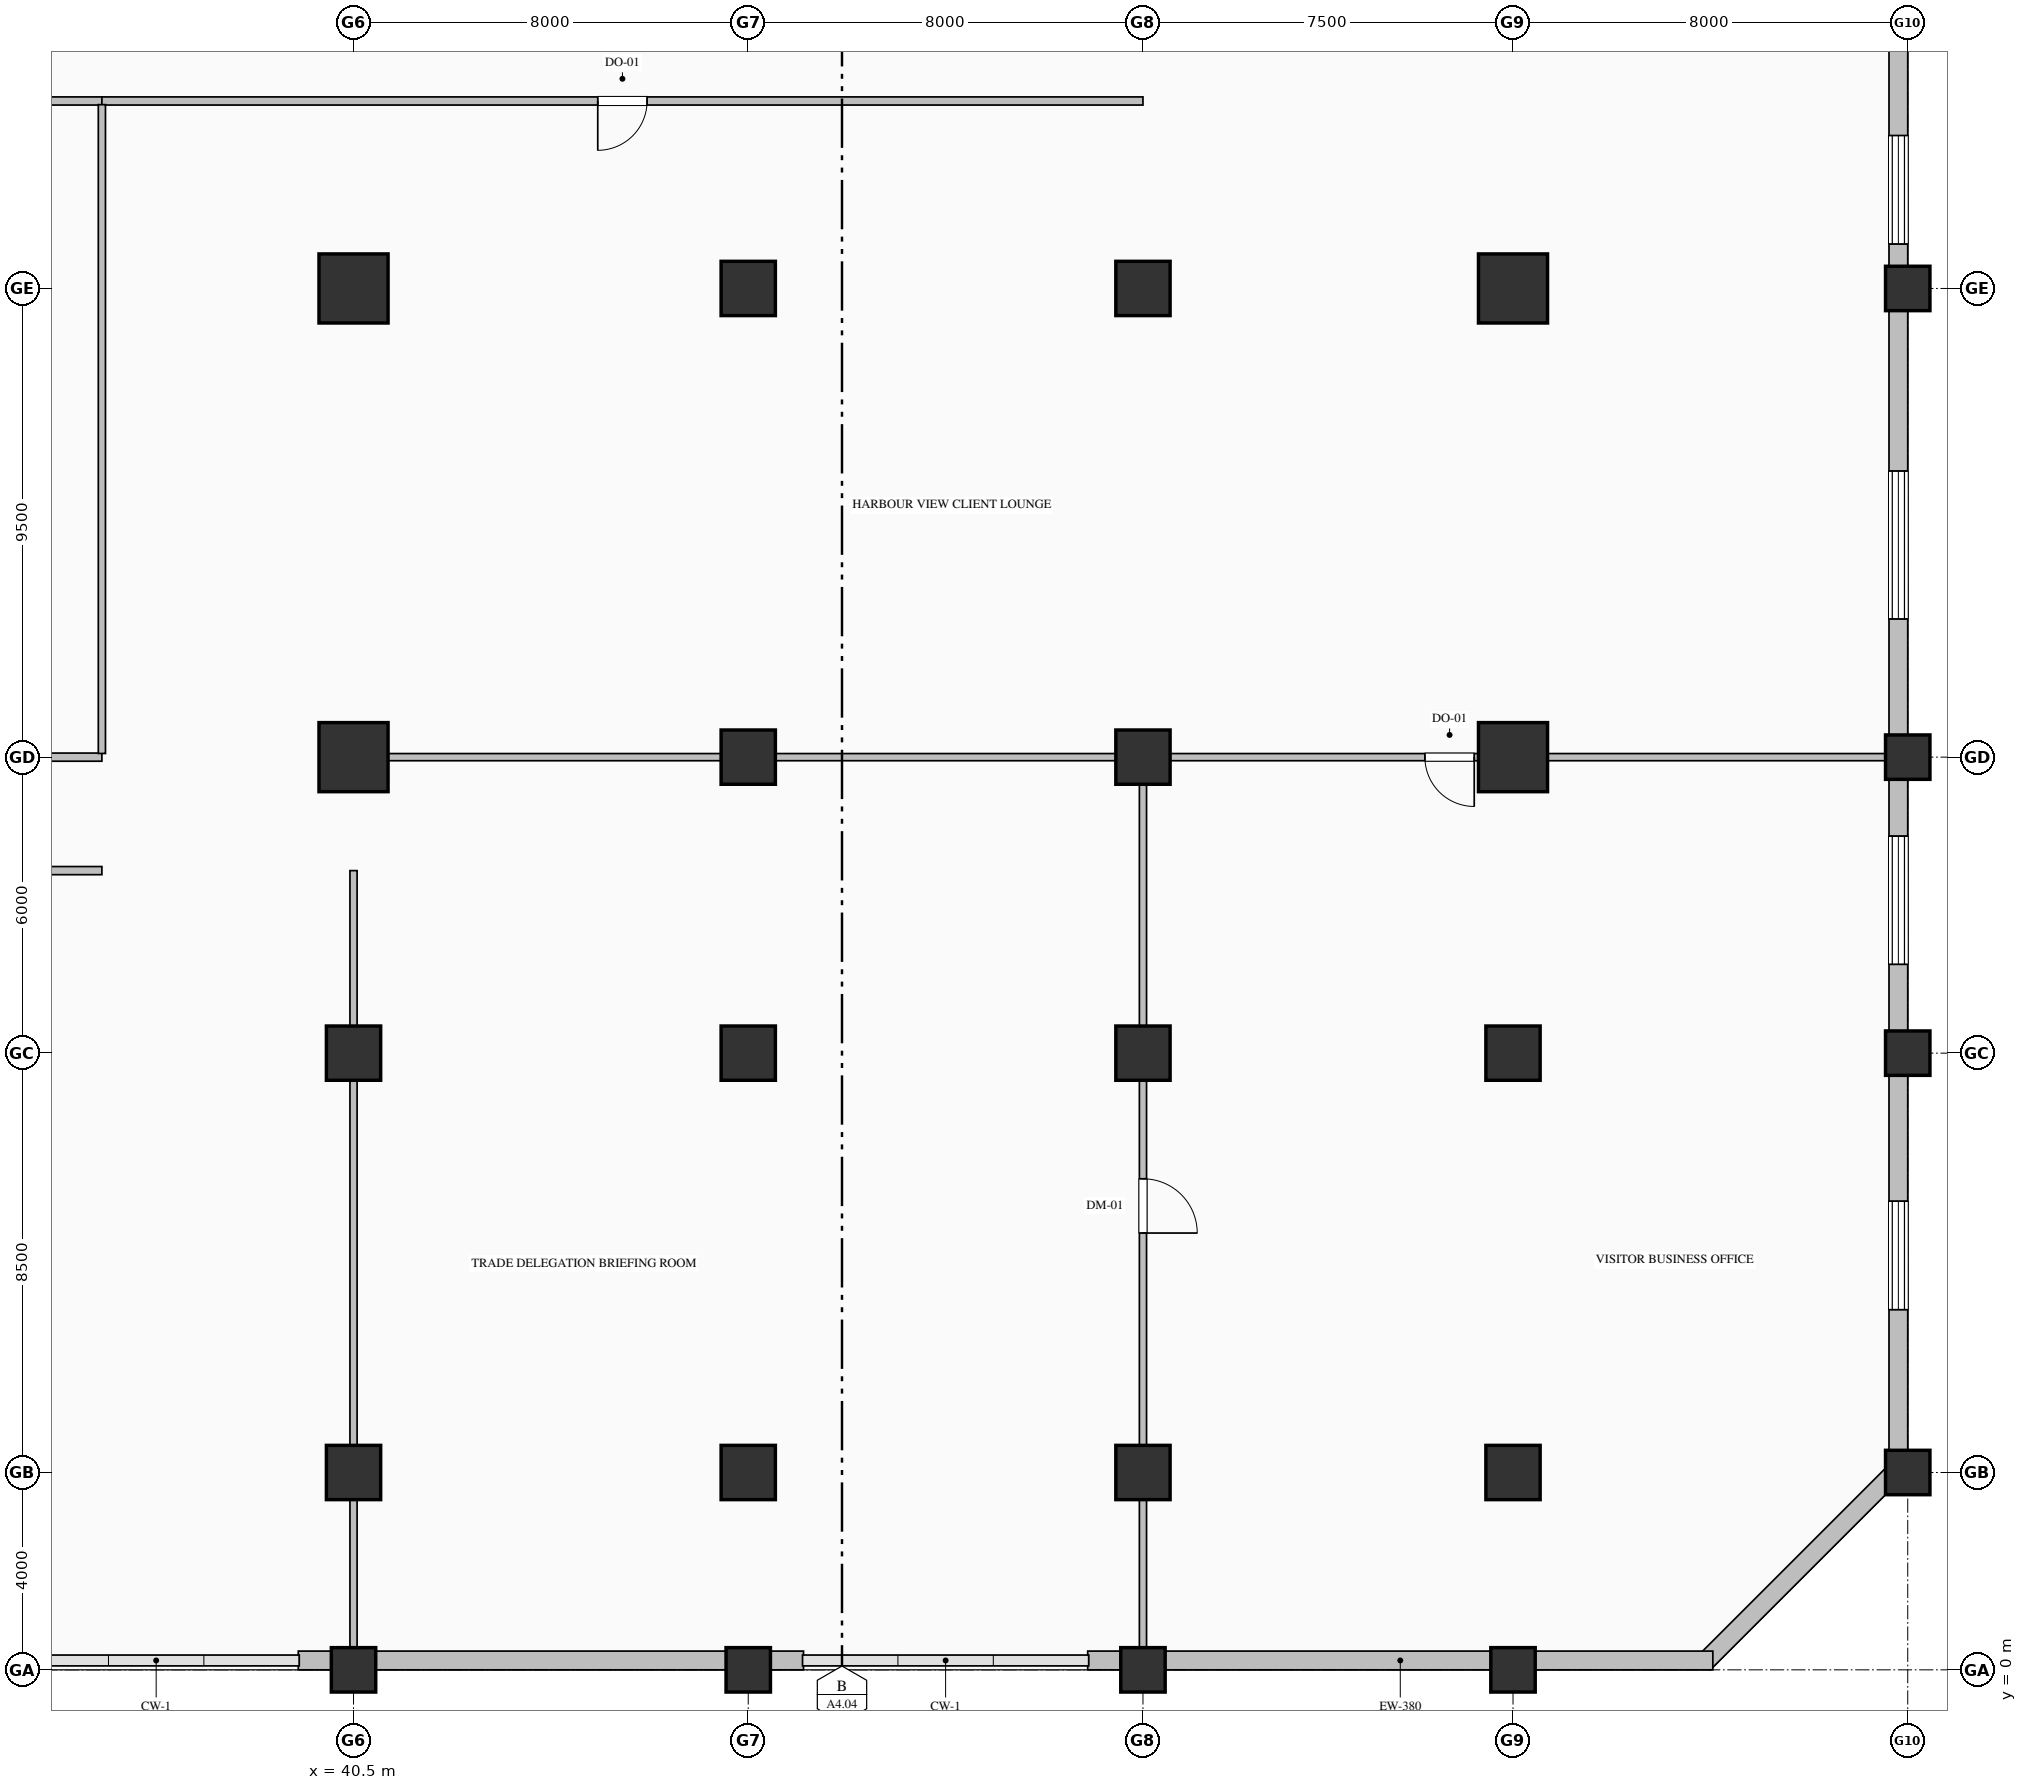
"""IFC4 building model, lengths in metres.
Left out: names, types, materials, properties, quantities, classifications, styles, units other than length and angle.
Written with IfcOpenShell. Run it as: python <this file> out.ifc"""

import sys

from ifc_helpers import new_model, si_unit, direction, frame, frame_2d, origin, origin_2d, place, context, subcontext, project, spatial, rectangle, hollow_rectangle, extrude, element, fill, save


model = new_model("IFC4")
c1 = context("Model", 3, precision=1e-05, world=origin(), true_north=direction((0.0, 1.0)))
c2 = subcontext(c1, "Body", "Model", "MODEL_VIEW")
j1 = project(units=[si_unit("LENGTHUNIT", "METRE"), si_unit("PLANEANGLEUNIT", "RADIAN")], contexts=[c1])
p1 = place(None, origin())
s1 = spatial("IfcSite", under=j1, at=p1, CompositionType="ELEMENT")
p2 = place(p1, origin())
s2 = spatial("IfcBuilding", under=s1, at=p2, CompositionType="ELEMENT")
p3 = place(p2, frame((0.0, 0.0, 6.0)))
s3 = spatial("IfcBuildingStorey", under=s2, at=p3, CompositionType="ELEMENT", Elevation=6.0)
p4 = place(p3, frame((40.5, 0.0, 0.0), z_axis=(0.0, 0.0, 1.0), x_axis=(1.0, 0.0, 0.0)))
e1 = element("IfcColumn", 1, at=p4, inside=s3, PredefinedType="PILASTER", context=c2, shape_type="SweptSolid", body=[
    extrude(rectangle(XDim=0.9, YDim=0.9, at=origin_2d()), origin(), (0.0, 0.0, 1.0), 5.4),
])
for number, where, z_axis, x_axis in (
    (2, (40.5, 4.0, 0.0), (0.0, 0.0, 1.0), (1.0, 0.0, 0.0)),
    (3, (40.5, 12.5, 0.0), (0.0, 0.0, 1.0), (1.0, 0.0, 0.0)),
):
    element("IfcColumn", number, at=place(p3, frame(where, z_axis=z_axis, x_axis=x_axis)), inside=s3, PredefinedType="COLUMN", context=c2, shape_type="SweptSolid", body=[
        extrude(rectangle(XDim=1.1, YDim=1.1, at=origin_2d()), origin(), (0.0, 0.0, 1.0), 5.4),
    ])
for number, where, z_axis, x_axis in (
    (4, (40.5, 18.5, 0.0), (0.0, 0.0, 1.0), (1.0, 0.0, 0.0)),
    (5, (40.5, 28.0, 0.0), (0.0, 0.0, 1.0), (1.0, 0.0, 0.0)),
):
    element("IfcColumn", number, at=place(p3, frame(where, z_axis=z_axis, x_axis=x_axis)), inside=s3, PredefinedType="COLUMN", context=c2, shape_type="SweptSolid", body=[
        extrude(hollow_rectangle(XDim=1.4, YDim=1.4, WallThickness=0.05, at=origin_2d()), origin(), (0.0, 0.0, 1.0), 5.4),
    ])
p5 = place(p3, frame((48.5, 0.0, 0.0), z_axis=(0.0, 0.0, 1.0), x_axis=(1.0, 0.0, 0.0)))
e6 = element("IfcColumn", 6, at=p5, inside=s3, PredefinedType="PILASTER", context=c2, shape_type="SweptSolid", body=[
    extrude(rectangle(XDim=0.9, YDim=0.9, at=origin_2d()), origin(), (0.0, 0.0, 1.0), 5.4),
])
for number, where, z_axis, x_axis in (
    (7, (48.5, 4.0, 0.0), (0.0, 0.0, 1.0), (1.0, 0.0, 0.0)),
    (8, (48.5, 12.5, 0.0), (0.0, 0.0, 1.0), (1.0, 0.0, 0.0)),
    (9, (48.5, 18.5, 0.0), (0.0, 0.0, 1.0), (1.0, 0.0, 0.0)),
    (10, (48.5, 28.0, 0.0), (0.0, 0.0, 1.0), (1.0, 0.0, 0.0)),
):
    element("IfcColumn", number, at=place(p3, frame(where, z_axis=z_axis, x_axis=x_axis)), inside=s3, PredefinedType="COLUMN", context=c2, shape_type="SweptSolid", body=[
        extrude(rectangle(XDim=1.1, YDim=1.1, at=origin_2d()), origin(), (0.0, 0.0, 1.0), 5.4),
    ])
p6 = place(p3, frame((56.5, 0.0, 0.0), z_axis=(0.0, 0.0, 1.0), x_axis=(1.0, 0.0, 0.0)))
e11 = element("IfcColumn", 11, at=p6, inside=s3, PredefinedType="PILASTER", context=c2, shape_type="SweptSolid", body=[
    extrude(rectangle(XDim=0.9, YDim=0.9, at=origin_2d()), origin(), (0.0, 0.0, 1.0), 5.4),
])
for number, where, z_axis, x_axis in (
    (12, (56.5, 4.0, 0.0), (0.0, 0.0, 1.0), (1.0, 0.0, 0.0)),
    (13, (56.5, 12.5, 0.0), (0.0, 0.0, 1.0), (1.0, 0.0, 0.0)),
    (14, (56.5, 18.5, 0.0), (0.0, 0.0, 1.0), (1.0, 0.0, 0.0)),
    (15, (56.5, 28.0, 0.0), (0.0, 0.0, 1.0), (1.0, 0.0, 0.0)),
):
    element("IfcColumn", number, at=place(p3, frame(where, z_axis=z_axis, x_axis=x_axis)), inside=s3, PredefinedType="COLUMN", context=c2, shape_type="SweptSolid", body=[
        extrude(rectangle(XDim=1.1, YDim=1.1, at=origin_2d()), origin(), (0.0, 0.0, 1.0), 5.4),
    ])
p7 = place(p3, frame((64.0, 0.0, 0.0), z_axis=(0.0, 0.0, 1.0), x_axis=(1.0, 0.0, 0.0)))
e16 = element("IfcColumn", 16, at=p7, inside=s3, PredefinedType="PILASTER", context=c2, shape_type="SweptSolid", body=[
    extrude(rectangle(XDim=0.9, YDim=0.9, at=origin_2d()), origin(), (0.0, 0.0, 1.0), 5.4),
])
for number, where, z_axis, x_axis in (
    (17, (64.0, 4.0, 0.0), (0.0, 0.0, 1.0), (1.0, 0.0, 0.0)),
    (18, (64.0, 12.5, 0.0), (0.0, 0.0, 1.0), (1.0, 0.0, 0.0)),
):
    element("IfcColumn", number, at=place(p3, frame(where, z_axis=z_axis, x_axis=x_axis)), inside=s3, PredefinedType="COLUMN", context=c2, shape_type="SweptSolid", body=[
        extrude(rectangle(XDim=1.1, YDim=1.1, at=origin_2d()), origin(), (0.0, 0.0, 1.0), 5.4),
    ])
for number, where, z_axis, x_axis in (
    (19, (64.0, 18.5, 0.0), (0.0, 0.0, 1.0), (1.0, 0.0, 0.0)),
    (20, (64.0, 28.0, 0.0), (0.0, 0.0, 1.0), (1.0, 0.0, 0.0)),
):
    element("IfcColumn", number, at=place(p3, frame(where, z_axis=z_axis, x_axis=x_axis)), inside=s3, PredefinedType="COLUMN", context=c2, shape_type="SweptSolid", body=[
        extrude(hollow_rectangle(XDim=1.4, YDim=1.4, WallThickness=0.05, at=origin_2d()), origin(), (0.0, 0.0, 1.0), 5.4),
    ])
for number, where, z_axis, x_axis in (
    (21, (72.0, 4.0, 0.0), (0.0, 0.0, 1.0), (1.0, 0.0, 0.0)),
    (22, (72.0, 12.5, 0.0), (0.0, 0.0, 1.0), (1.0, 0.0, 0.0)),
    (23, (72.0, 18.5, 0.0), (0.0, 0.0, 1.0), (1.0, 0.0, 0.0)),
    (24, (72.0, 28.0, 0.0), (0.0, 0.0, 1.0), (1.0, 0.0, 0.0)),
):
    element("IfcColumn", number, at=place(p3, frame(where, z_axis=z_axis, x_axis=x_axis)), inside=s3, PredefinedType="PILASTER", context=c2, shape_type="SweptSolid", body=[
        extrude(rectangle(XDim=0.9, YDim=0.9, at=origin_2d()), origin(), (0.0, 0.0, 1.0), 5.4),
    ])
p8 = place(p3, frame((71.81, 48.0, 0.0), z_axis=(0.0, 0.0, 1.0), x_axis=(0.0, -1.0, 0.0)))
e25 = element("IfcWall", 25, at=p8, inside=s3, PredefinedType="SOLIDWALL", context=c2, shape_type="SweptSolid", body=[
    extrude(rectangle(XDim=44.0, YDim=0.38, at=frame_2d((22.0, 0.0))), origin(), (0.0, 0.0, 1.0), 4.62),
])
p9 = place(p8, frame((6.1, 0.0, 0.9)))
e26 = element("IfcOpeningElement", 26, at=p9, cuts=e25, PredefinedType="OPENING", context=c2, shape_type="SweptSolid", body=[
    extrude(rectangle(XDim=2.2, YDim=2.65, at=frame_2d((1.1, 1.325))), frame((0.0, 0.2, 0.0), z_axis=(0.0, -1.0, 0.0), x_axis=(1.0, 0.0, 0.0)), (0.0, 0.0, 1.0), 0.4),
])
p10 = place(p8, frame((16.9, 0.0, 0.9)))
e27 = element("IfcOpeningElement", 27, at=p10, cuts=e25, PredefinedType="OPENING", context=c2, shape_type="SweptSolid", body=[
    extrude(rectangle(XDim=2.2, YDim=2.65, at=frame_2d((1.1, 1.325))), frame((0.0, 0.2, 0.0), z_axis=(0.0, -1.0, 0.0), x_axis=(1.0, 0.0, 0.0)), (0.0, 0.0, 1.0), 0.4),
])
p11 = place(p8, frame((23.7, 0.0, 0.85)))
e28 = element("IfcOpeningElement", 28, at=p11, cuts=e25, PredefinedType="OPENING", context=c2, shape_type="SweptSolid", body=[
    extrude(rectangle(XDim=3.0, YDim=3.2, at=frame_2d((1.5, 1.6))), frame((0.0, 0.2, 0.0), z_axis=(0.0, -1.0, 0.0), x_axis=(1.0, 0.0, 0.0)), (0.0, 0.0, 1.0), 0.4),
])
p12 = place(p8, frame((31.1, 0.0, 0.85)))
e29 = element("IfcOpeningElement", 29, at=p12, cuts=e25, PredefinedType="OPENING", context=c2, shape_type="SweptSolid", body=[
    extrude(rectangle(XDim=2.6, YDim=3.1, at=frame_2d((1.3, 1.55))), frame((0.0, 0.2, 0.0), z_axis=(0.0, -1.0, 0.0), x_axis=(1.0, 0.0, 0.0)), (0.0, 0.0, 1.0), 0.4),
])
p13 = place(p8, frame((38.5, 0.0, 0.9)))
e30 = element("IfcOpeningElement", 30, at=p13, cuts=e25, PredefinedType="OPENING", context=c2, shape_type="SweptSolid", body=[
    extrude(rectangle(XDim=2.2, YDim=2.65, at=frame_2d((1.1, 1.325))), frame((0.0, 0.2, 0.0), z_axis=(0.0, -1.0, 0.0), x_axis=(1.0, 0.0, 0.0)), (0.0, 0.0, 1.0), 0.4),
])
p14 = place(p3, frame((71.866, 4.134, 0.0), z_axis=(0.0, 0.0, 1.0), x_axis=(-0.707106781187, -0.707106781187, 0.0)))
e31 = element("IfcWall", 31, at=p14, inside=s3, PredefinedType="SOLIDWALL", context=c2, shape_type="SweptSolid", body=[
    extrude(rectangle(XDim=5.657, YDim=0.38, at=frame_2d((2.828, 0.0))), origin(), (0.0, 0.0, 1.0), 3.72),
])
p15 = place(p3, frame((49.62, 0.19, 0.0), z_axis=(0.0, 0.0, 1.0), x_axis=(-1.0, 0.0, 0.0)))
e32 = element("IfcWall", 32, at=p15, inside=s3, PredefinedType="SOLIDWALL", context=c2, shape_type="SweptSolid", body=[
    extrude(rectangle(XDim=10.24, YDim=0.38, at=frame_2d((5.12, 0.0))), origin(), (0.0, 0.0, 1.0), 4.62),
])
p16 = place(p3, frame((68.05, 0.19, 0.0), z_axis=(0.0, 0.0, 1.0), x_axis=(-1.0, 0.0, 0.0)))
e33 = element("IfcWall", 33, at=p16, inside=s3, PredefinedType="SOLIDWALL", context=c2, shape_type="SweptSolid", body=[
    extrude(rectangle(XDim=12.67, YDim=0.38, at=frame_2d((6.335, 0.0))), origin(), (0.0, 0.0, 1.0), 4.62),
])
p17 = place(p3, frame((35.4, 31.8, 0.0), z_axis=(0.0, 0.0, 1.0), x_axis=(-1.0, 0.0, 0.0)))
e34 = element("IfcWall", 34, at=p17, inside=s3, PredefinedType="PARTITIONING", context=c2, shape_type="SweptSolid", body=[
    extrude(rectangle(XDim=2.2, YDim=0.165, at=frame_2d((1.1, 0.0))), origin(), (0.0, 0.0, 1.0), 5.12),
])
p18 = place(p3, frame((56.5, 31.8, 0.0), z_axis=(0.0, 0.0, 1.0), x_axis=(-1.0, 0.0, 0.0)))
e35 = element("IfcWall", 35, at=p18, inside=s3, PredefinedType="PARTITIONING", context=c2, shape_type="SweptSolid", body=[
    extrude(rectangle(XDim=21.1, YDim=0.165, at=frame_2d((10.55, 0.0))), origin(), (0.0, 0.0, 1.0), 5.12),
])
p19 = place(p18, frame((10.05, 0.0, 0.0)))
e36 = element("IfcOpeningElement", 36, at=p19, cuts=e35, PredefinedType="OPENING", context=c2, shape_type="SweptSolid", body=[
    extrude(rectangle(XDim=1.0, YDim=2.15, at=frame_2d((0.5, 1.075))), frame((0.0, 0.093, 0.0), z_axis=(0.0, -1.0, 0.0), x_axis=(1.0, 0.0, 0.0)), (0.0, 0.0, 1.0), 0.185),
])
p20 = place(p3, frame((9.4, 18.5, 0.0), z_axis=(0.0, 0.0, 1.0), x_axis=(1.0, 0.0, 0.0)))
e37 = element("IfcWall", 37, at=p20, inside=s3, PredefinedType="PARTITIONING", context=c2, shape_type="SweptSolid", body=[
    extrude(rectangle(XDim=26.0, YDim=0.165, at=frame_2d((13.0, 0.0))), origin(), (0.0, 0.0, 1.0), 4.212),
])
p21 = place(p20, frame((12.2, 0.0, 0.0)))
e38 = element("IfcOpeningElement", 38, at=p21, cuts=e37, PredefinedType="OPENING", context=c2, shape_type="SweptSolid", body=[
    extrude(rectangle(XDim=1.6, YDim=2.25, at=frame_2d((0.8, 1.125))), frame((0.0, 0.093, 0.0), z_axis=(0.0, -1.0, 0.0), x_axis=(1.0, 0.0, 0.0)), (0.0, 0.0, 1.0), 0.185),
])
p22 = place(p3, frame((35.4, 16.2, 0.0), z_axis=(0.0, 0.0, 1.0), x_axis=(-1.0, 0.0, 0.0)))
e39 = element("IfcWall", 39, at=p22, inside=s3, PredefinedType="PARTITIONING", context=c2, shape_type="SweptSolid", body=[
    extrude(rectangle(XDim=17.96, YDim=0.165, at=frame_2d((8.98, 0.0))), origin(), (0.0, 0.0, 1.0), 5.12),
])
p23 = place(p22, frame((8.43, 0.0, 0.0)))
e40 = element("IfcOpeningElement", 40, at=p23, cuts=e39, PredefinedType="OPENING", context=c2, shape_type="SweptSolid", body=[
    extrude(rectangle(XDim=1.1, YDim=2.2, at=frame_2d((0.55, 1.1))), frame((0.0, 0.093, 0.0), z_axis=(0.0, -1.0, 0.0), x_axis=(1.0, 0.0, 0.0)), (0.0, 0.0, 1.0), 0.185),
])
p24 = place(p3, frame((35.4, 31.726, 0.0), z_axis=(0.0, 0.0, 1.0), x_axis=(0.0, -1.0, 0.0)))
e41 = element("IfcWall", 41, at=p24, inside=s3, PredefinedType="PARTITIONING", context=c2, shape_type="SweptSolid", body=[
    extrude(rectangle(XDim=13.151, YDim=0.145, at=frame_2d((6.576, 0.0))), origin(), (0.0, 0.0, 1.0), 5.12),
])
p25 = place(p3, frame((56.5, 18.5, 0.0), z_axis=(0.0, 0.0, 1.0), x_axis=(-1.0, 0.0, 0.0)))
e42 = element("IfcWall", 42, at=p25, inside=s3, PredefinedType="PARTITIONING", context=c2, shape_type="SweptSolid", body=[
    extrude(rectangle(XDim=16.0, YDim=0.145, at=frame_2d((8.0, 0.0))), origin(), (0.0, 0.0, 1.0), 4.212),
])
p26 = place(p3, frame((71.628, 18.5, 0.0), z_axis=(0.0, 0.0, 1.0), x_axis=(-1.0, 0.0, 0.0)))
e43 = element("IfcWall", 43, at=p26, inside=s3, PredefinedType="PARTITIONING", context=c2, shape_type="SweptSolid", body=[
    extrude(rectangle(XDim=15.128, YDim=0.145, at=frame_2d((7.564, 0.0))), origin(), (0.0, 0.0, 1.0), 4.212),
])
p27 = place(p26, frame((8.414, 0.0, 0.0)))
e44 = element("IfcOpeningElement", 44, at=p27, cuts=e43, PredefinedType="OPENING", context=c2, shape_type="SweptSolid", body=[
    extrude(rectangle(XDim=1.0, YDim=2.15, at=frame_2d((0.5, 1.075))), frame((0.0, 0.083, 0.0), z_axis=(0.0, -1.0, 0.0), x_axis=(1.0, 0.0, 0.0)), (0.0, 0.0, 1.0), 0.165),
])
p28 = place(p3, frame((40.5, 16.2, 0.0), z_axis=(0.0, 0.0, 1.0), x_axis=(0.0, -1.0, 0.0)))
e45 = element("IfcWall", 45, at=p28, inside=s3, PredefinedType="PARTITIONING", context=c2, shape_type="SweptSolid", body=[
    extrude(rectangle(XDim=15.828, YDim=0.145, at=frame_2d((7.914, 0.0))), origin(), (0.0, 0.0, 1.0), 4.212),
])
p29 = place(p3, frame((56.5, 18.436, 0.0), z_axis=(0.0, 0.0, 1.0), x_axis=(0.0, -1.0, 0.0)))
e46 = element("IfcWall", 46, at=p29, inside=s3, PredefinedType="PARTITIONING", context=c2, shape_type="SweptSolid", body=[
    extrude(rectangle(XDim=18.063, YDim=0.145, at=frame_2d((9.032, 0.0))), origin(), (0.0, 0.0, 1.0), 4.212),
])
p30 = place(p29, frame((8.482, 0.0, 0.0)))
e47 = element("IfcOpeningElement", 47, at=p30, cuts=e46, PredefinedType="OPENING", context=c2, shape_type="SweptSolid", body=[
    extrude(rectangle(XDim=1.1, YDim=2.2, at=frame_2d((0.55, 1.1))), frame((0.0, 0.083, 0.0), z_axis=(0.0, -1.0, 0.0), x_axis=(1.0, 0.0, 0.0)), (0.0, 0.0, 1.0), 0.165),
])
p31 = place(p10, origin())
e48 = element("IfcWindow", 48, at=p31, inside=s3, PartitioningType="TRIPLE_PANEL_VERTICAL", PredefinedType="WINDOW", context=c2, shape_type="SweptSolid", body=[
    extrude(rectangle(XDim=2.2, YDim=2.65, at=frame_2d((1.1, 1.325))), frame((0.0, 0.15, 0.0), z_axis=(0.0, -1.0, 0.0), x_axis=(1.0, 0.0, 0.0)), (0.0, 0.0, 1.0), 0.06),
])
fill(e27, e48)
p32 = place(p11, origin())
e49 = element("IfcWindow", 49, at=p32, inside=s3, PartitioningType="TRIPLE_PANEL_VERTICAL", PredefinedType="WINDOW", context=c2, shape_type="SweptSolid", body=[
    extrude(rectangle(XDim=3.0, YDim=3.2, at=frame_2d((1.5, 1.6))), frame((0.0, 0.15, 0.0), z_axis=(0.0, -1.0, 0.0), x_axis=(1.0, 0.0, 0.0)), (0.0, 0.0, 1.0), 0.06),
])
fill(e28, e49)
p33 = place(p12, origin())
e50 = element("IfcWindow", 50, at=p33, inside=s3, PartitioningType="TRIPLE_PANEL_VERTICAL", PredefinedType="WINDOW", context=c2, shape_type="SweptSolid", body=[
    extrude(rectangle(XDim=2.6, YDim=3.1, at=frame_2d((1.3, 1.55))), frame((0.0, 0.15, 0.0), z_axis=(0.0, -1.0, 0.0), x_axis=(1.0, 0.0, 0.0)), (0.0, 0.0, 1.0), 0.06),
])
fill(e29, e50)
p34 = place(p13, origin())
e51 = element("IfcWindow", 51, at=p34, inside=s3, PartitioningType="TRIPLE_PANEL_VERTICAL", PredefinedType="WINDOW", context=c2, shape_type="SweptSolid", body=[
    extrude(rectangle(XDim=2.2, YDim=2.65, at=frame_2d((1.1, 1.325))), frame((0.0, 0.15, 0.0), z_axis=(0.0, -1.0, 0.0), x_axis=(1.0, 0.0, 0.0)), (0.0, 0.0, 1.0), 0.06),
])
fill(e30, e51)
p35 = place(p19, origin())
e52 = element("IfcDoor", 52, at=p35, inside=s3, OperationType="SINGLE_SWING_RIGHT", PredefinedType="DOOR", context=c2, shape_type="SweptSolid", body=[
    extrude(rectangle(XDim=1.0, YDim=2.15, at=frame_2d((0.5, 1.075))), frame((0.0, 0.025, 0.0), z_axis=(0.0, -1.0, 0.0), x_axis=(1.0, 0.0, 0.0)), (0.0, 0.0, 1.0), 0.05),
])
fill(e36, e52)
p36 = place(p30, origin())
e53 = element("IfcDoor", 53, at=p36, inside=s3, OperationType="SINGLE_SWING_RIGHT", PredefinedType="DOOR", context=c2, shape_type="SweptSolid", body=[
    extrude(rectangle(XDim=1.1, YDim=2.2, at=frame_2d((0.55, 1.1))), frame((0.0, 0.025, 0.0), z_axis=(0.0, -1.0, 0.0), x_axis=(1.0, 0.0, 0.0)), (0.0, 0.0, 1.0), 0.05),
])
fill(e47, e53)
p37 = place(p27, origin())
e54 = element("IfcDoor", 54, at=p37, inside=s3, OperationType="SINGLE_SWING_LEFT", PredefinedType="DOOR", context=c2, shape_type="SweptSolid", body=[
    extrude(rectangle(XDim=1.0, YDim=2.15, at=frame_2d((0.5, 1.075))), frame((0.0, 0.025, 0.0), z_axis=(0.0, -1.0, 0.0), x_axis=(1.0, 0.0, 0.0)), (0.0, 0.0, 1.0), 0.05),
])
fill(e44, e54)
save(model, sys.argv[1])
